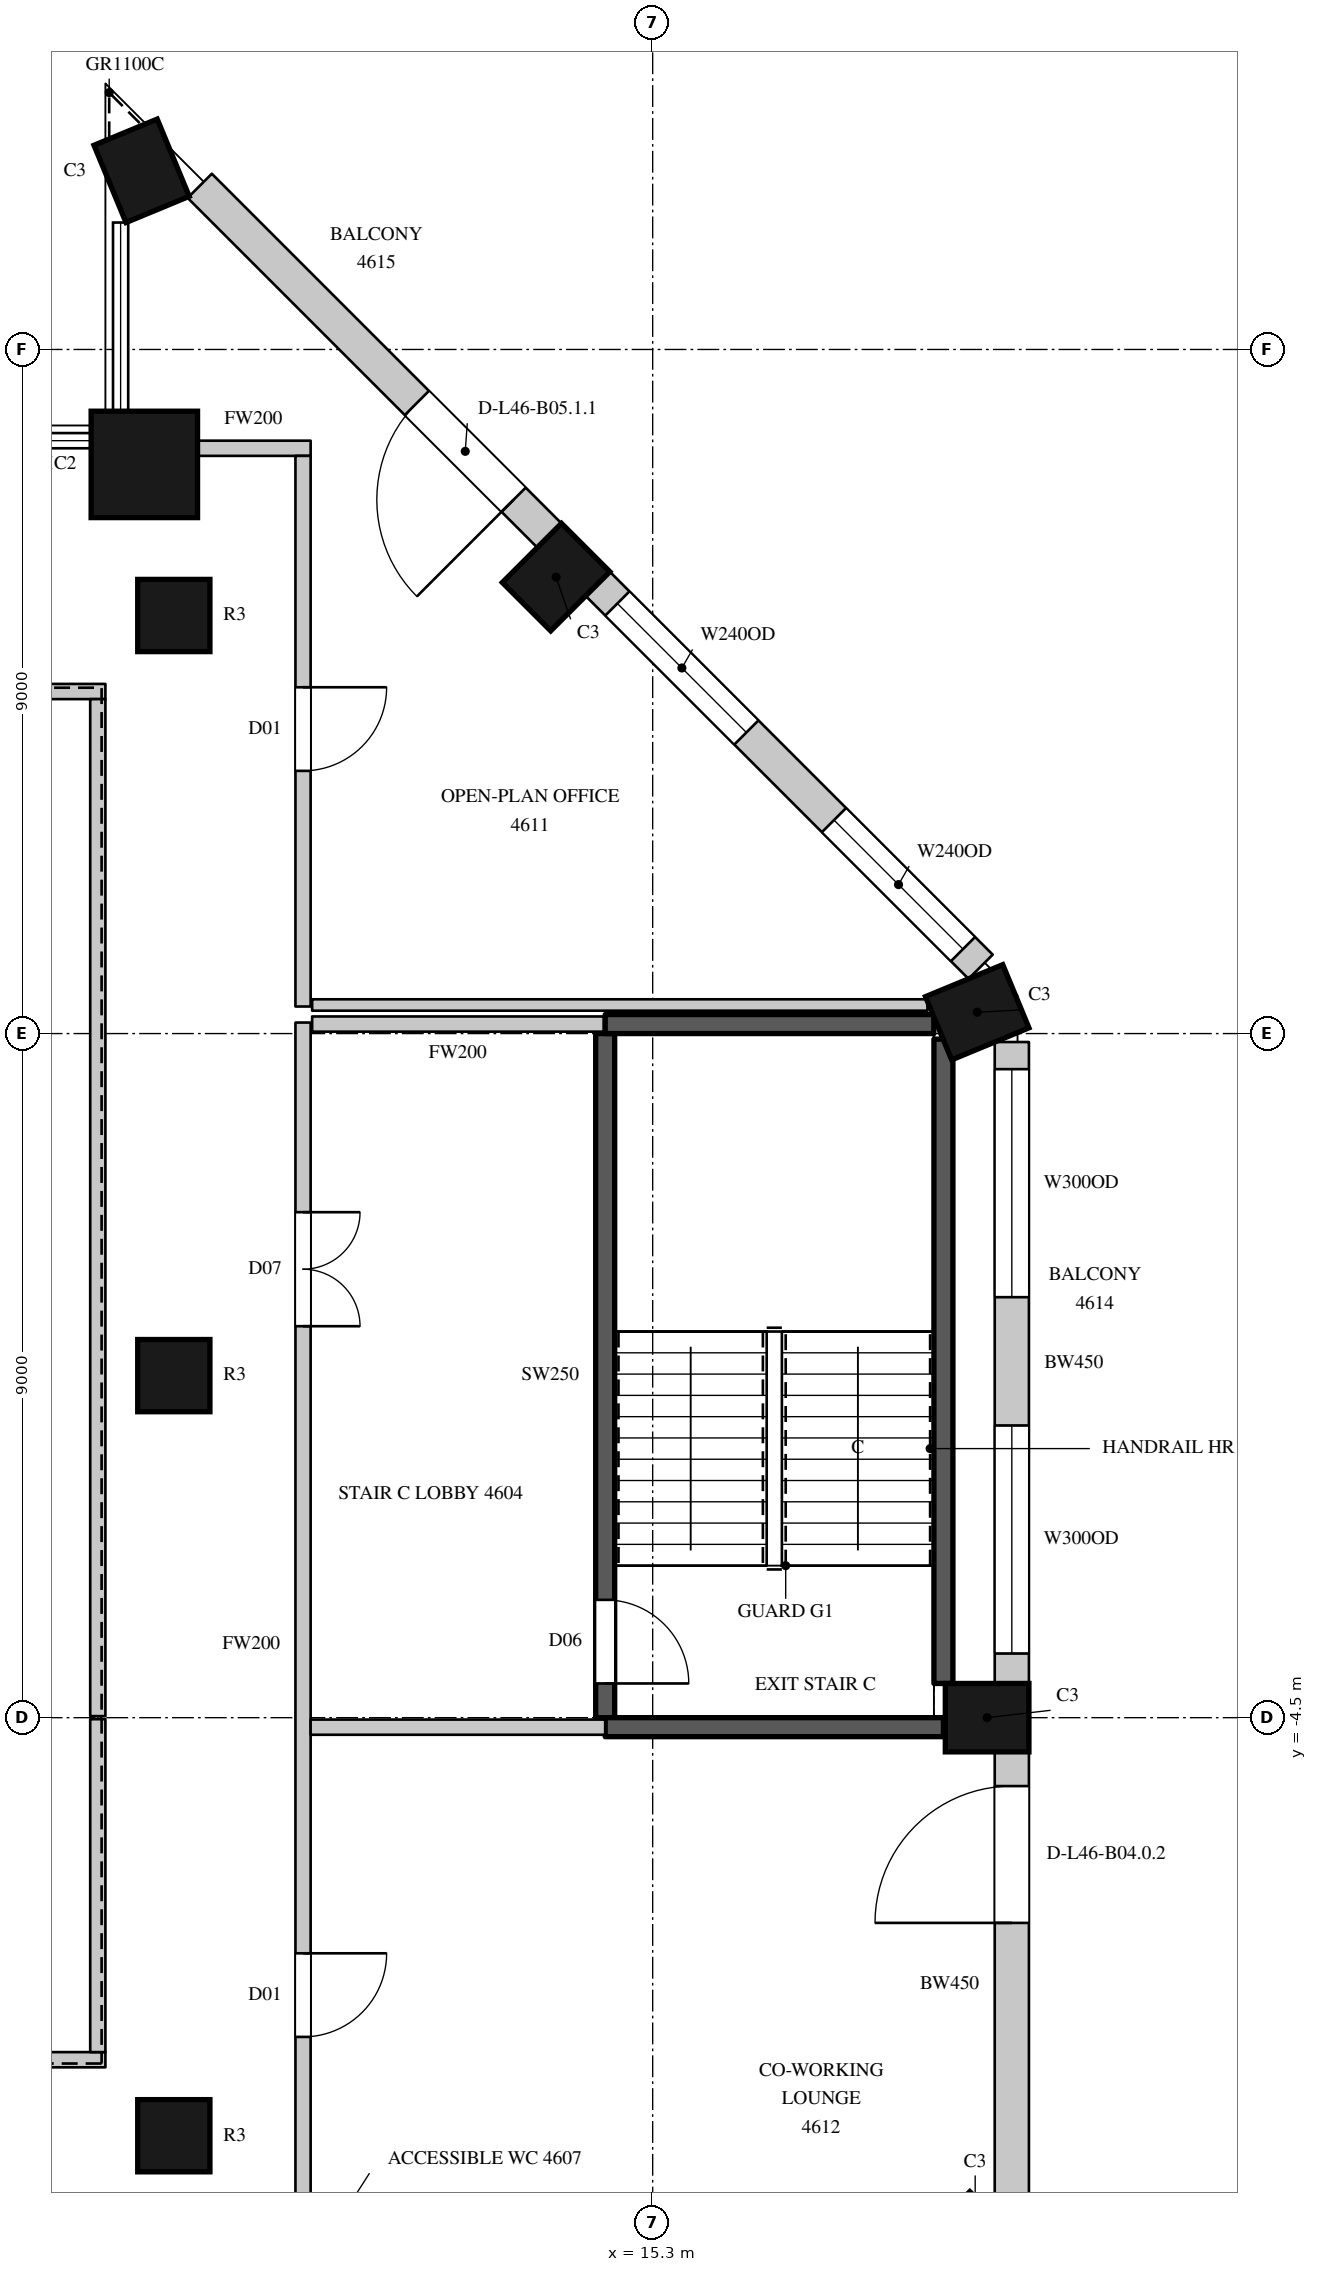
"""IFC4 building model, lengths in metres.
Left out: names, types, materials, properties, quantities, classifications, styles, units other than length and angle.
Written with IfcOpenShell. Run it as: python <this file> out.ifc"""

import sys

from ifc_helpers import new_model, si_unit, direction, frame, frame_2d, origin, origin_2d, place, context, subcontext, project, spatial, rectangle, circle, extrude, element, fill, save


model = new_model("IFC4")
c1 = context("Model", 3, precision=1e-05, world=origin(), true_north=direction((0.0, 1.0)))
c2 = subcontext(c1, "Body", "Model", "MODEL_VIEW")
j1 = project(units=[si_unit("LENGTHUNIT", "METRE"), si_unit("PLANEANGLEUNIT", "RADIAN")], contexts=[c1])
p1 = place(None, origin())
s1 = spatial("IfcSite", under=j1, at=p1, CompositionType="ELEMENT")
p2 = place(p1, origin())
s2 = spatial("IfcBuilding", under=s1, at=p2, CompositionType="ELEMENT")
p3 = place(p2, frame((0.0, 0.0, 209.7)))
s3 = spatial("IfcBuildingStorey", under=s2, at=p3, CompositionType="ELEMENT", Elevation=209.7)
for number, where, z_axis, x_axis in (
    (1, (19.543, -11.443, 0.0), (0.0, 0.0, 1.0), (0.707, 0.707, 0.0)),
    (2, (19.7, -4.5, 0.0), (0.0, 0.0, 1.0), (0.0, 1.0, 0.0)),
    (3, (19.57, 4.78, 0.0), (0.0, 0.0, 1.0), (-0.383, 0.924, 0.0)),
    (4, (14.029, 10.505, 0.0), (0.0, 0.0, 1.0), (-0.707, 0.707, 0.0)),
    (5, (8.576, 15.85, 0.0), (0.0, 0.0, 1.0), (-0.924, -0.383, 0.0)),
):
    element("IfcColumn", number, at=place(p3, frame(where, z_axis=z_axis, x_axis=x_axis)), inside=s3, PredefinedType="COLUMN", context=c2, shape_type="SweptSolid", body=[
        extrude(rectangle(XDim=0.9, YDim=1.1, at=origin_2d()), origin(), (0.0, 0.0, 1.0), 4.1),
    ])
p4 = place(p3, frame((8.612, 11.988, 0.0), z_axis=(0.0, 0.0, 1.0), x_axis=(1.0, 0.0, 0.0)))
e6 = element("IfcColumn", 6, at=p4, inside=s3, PredefinedType="COLUMN", context=c2, shape_type="SweptSolid", body=[
    extrude(circle(Radius=0.7, at=origin_2d()), origin(), (0.0, 0.0, 1.0), 4.1),
])
for number, where, z_axis, x_axis in (
    (7, (9.0, -10.0, 0.0), (0.0, 0.0, 1.0), (1.0, 0.0, 0.0)),
    (8, (9.0, 0.0, 0.0), (0.0, 0.0, 1.0), (1.0, 0.0, 0.0)),
    (9, (9.0, 10.0, 0.0), (0.0, 0.0, 1.0), (1.0, 0.0, 0.0)),
):
    element("IfcColumn", number, at=place(p3, frame(where, z_axis=z_axis, x_axis=x_axis)), inside=s3, PredefinedType="COLUMN", context=c2, shape_type="SweptSolid", body=[
        extrude(circle(Radius=0.475, at=origin_2d()), origin(), (0.0, 0.0, 1.0), 4.1),
    ])
p5 = place(p3, frame((20.025, -11.064, 0.0), z_axis=(0.0, 0.0, 1.0), x_axis=(0.0, 1.0, 0.0)))
e10 = element("IfcWall", 10, at=p5, inside=s3, PredefinedType="SOLIDWALL", context=c2, shape_type="SweptSolid", body=[
    extrude(rectangle(XDim=6.114, YDim=0.45, at=frame_2d((3.057, 0.0))), origin(), (0.0, 0.0, 1.0), 3.8),
])
p6 = place(p5, frame((3.864, 0.0, 0.0)))
e11 = element("IfcOpeningElement", 11, at=p6, cuts=e10, PredefinedType="OPENING", context=c2, shape_type="SweptSolid", body=[
    extrude(rectangle(XDim=1.8, YDim=2.4, at=frame_2d((0.9, 1.2))), frame((0.0, 0.235, 0.0), z_axis=(0.0, -1.0, 0.0), x_axis=(1.0, 0.0, 0.0)), (0.0, 0.0, 1.0), 0.47),
])
p7 = place(p3, frame((20.025, -4.05, 0.0), z_axis=(0.0, 0.0, 1.0), x_axis=(0.0, 1.0, 0.0)))
e12 = element("IfcWall", 12, at=p7, inside=s3, PredefinedType="SOLIDWALL", context=c2, shape_type="SweptSolid", body=[
    extrude(rectangle(XDim=8.439, YDim=0.45, at=frame_2d((4.219, 0.0))), origin(), (0.0, 0.0, 1.0), 3.8),
])
p8 = place(p7, frame((0.394, 0.0, 1.05)))
e13 = element("IfcOpeningElement", 13, at=p8, cuts=e12, PredefinedType="OPENING", context=c2, shape_type="SweptSolid", body=[
    extrude(rectangle(XDim=3.0, YDim=2.4, at=frame_2d((1.5, 1.2))), frame((0.0, 0.235, 0.0), z_axis=(0.0, -1.0, 0.0), x_axis=(1.0, 0.0, 0.0)), (0.0, 0.0, 1.0), 0.47),
])
p9 = place(p7, frame((5.082, 0.0, 1.05)))
e14 = element("IfcOpeningElement", 14, at=p9, cuts=e12, PredefinedType="OPENING", context=c2, shape_type="SweptSolid", body=[
    extrude(rectangle(XDim=3.0, YDim=2.4, at=frame_2d((1.5, 1.2))), frame((0.0, 0.235, 0.0), z_axis=(0.0, -1.0, 0.0), x_axis=(1.0, 0.0, 0.0)), (0.0, 0.0, 1.0), 0.47),
])
p10 = place(p3, frame((19.615, 5.379, 0.0), z_axis=(0.0, 0.0, 1.0), x_axis=(-0.707089646058, 0.7071239159, 0.0)))
e15 = element("IfcWall", 15, at=p10, inside=s3, PredefinedType="SOLIDWALL", context=c2, shape_type="SweptSolid", body=[
    extrude(rectangle(XDim=7.124, YDim=0.45, at=frame_2d((3.562, 0.0))), origin(), (0.0, 0.0, 1.0), 3.8),
])
p11 = place(p10, frame((0.328, 0.0, 1.05)))
e16 = element("IfcOpeningElement", 16, at=p11, cuts=e15, PredefinedType="OPENING", context=c2, shape_type="SweptSolid", body=[
    extrude(rectangle(XDim=2.4, YDim=2.4, at=frame_2d((1.2, 1.2))), frame((0.0, 0.235, 0.0), z_axis=(0.0, -1.0, 0.0), x_axis=(1.0, 0.0, 0.0)), (0.0, 0.0, 1.0), 0.47),
])
p12 = place(p10, frame((4.359, 0.0, 1.05)))
e17 = element("IfcOpeningElement", 17, at=p12, cuts=e15, PredefinedType="OPENING", context=c2, shape_type="SweptSolid", body=[
    extrude(rectangle(XDim=2.4, YDim=2.4, at=frame_2d((1.2, 1.2))), frame((0.0, 0.235, 0.0), z_axis=(0.0, -1.0, 0.0), x_axis=(1.0, 0.0, 0.0)), (0.0, 0.0, 1.0), 0.47),
])
p13 = place(p3, frame((13.941, 11.053, 0.0), z_axis=(0.0, 0.0, 1.0), x_axis=(-0.707106781187, 0.707106781187, 0.0)))
e18 = element("IfcWall", 18, at=p13, inside=s3, PredefinedType="SOLIDWALL", context=c2, shape_type="SweptSolid", body=[
    extrude(rectangle(XDim=6.505, YDim=0.45, at=frame_2d((3.252, 0.0))), origin(), (0.0, 0.0, 1.0), 3.8),
])
p14 = place(p13, frame((0.665, 0.0, 0.0)))
e19 = element("IfcOpeningElement", 19, at=p14, cuts=e18, PredefinedType="OPENING", context=c2, shape_type="SweptSolid", body=[
    extrude(rectangle(XDim=1.8, YDim=2.4, at=frame_2d((0.9, 1.2))), frame((0.0, 0.235, 0.0), z_axis=(0.0, -1.0, 0.0), x_axis=(1.0, 0.0, 0.0)), (0.0, 0.0, 1.0), 0.47),
])
for number, where, z_axis, x_axis in (
    (20, (-6.1, -9.0, 0.0), (0.0, 0.0, 1.0), (1.0, 0.0, 0.0)),
    (21, (-6.1, 9.0, 0.0), (0.0, 0.0, 1.0), (1.0, 0.0, 0.0)),
):
    element("IfcWall", number, at=place(p3, frame(where, z_axis=z_axis, x_axis=x_axis)), inside=s3, PredefinedType="PARTITIONING", context=c2, shape_type="SweptSolid", body=[
        extrude(rectangle(XDim=14.2, YDim=0.2, at=frame_2d((7.1, 0.0))), origin(), (0.0, 0.0, 1.0), 3.8),
    ])
p15 = place(p3, frame((8.0, -8.9, 0.0), z_axis=(0.0, 0.0, 1.0), x_axis=(0.0, 1.0, 0.0)))
e22 = element("IfcWall", 22, at=p15, inside=s3, PredefinedType="PARTITIONING", context=c2, shape_type="SweptSolid", body=[
    extrude(rectangle(XDim=4.38, YDim=0.2, at=frame_2d((2.19, 0.0))), origin(), (0.0, 0.0, 1.0), 3.8),
])
p16 = place(p3, frame((8.0, -4.48, 0.0), z_axis=(0.0, 0.0, 1.0), x_axis=(0.0, 1.0, 0.0)))
e23 = element("IfcWall", 23, at=p16, inside=s3, PredefinedType="PARTITIONING", context=c2, shape_type="SweptSolid", body=[
    extrude(rectangle(XDim=13.38, YDim=0.2, at=frame_2d((6.69, 0.0))), origin(), (0.0, 0.0, 1.0), 3.8),
])
p17 = place(p3, frame((9.296, 12.2, 0.0), z_axis=(0.0, 0.0, 1.0), x_axis=(1.0, 0.0, 0.0)))
e24 = element("IfcWall", 24, at=p17, inside=s3, PredefinedType="PARTITIONING", context=c2, shape_type="SweptSolid", body=[
    extrude(rectangle(XDim=1.504, YDim=0.2, at=frame_2d((0.752, 0.0))), origin(), (0.0, 0.0, 1.0), 3.8),
])
p18 = place(p3, frame((10.7, -11.7, 0.0), z_axis=(0.0, 0.0, 1.0), x_axis=(0.0, 1.0, 0.0)))
e25 = element("IfcWall", 25, at=p18, inside=s3, PredefinedType="PARTITIONING", context=c2, shape_type="SweptSolid", body=[
    extrude(rectangle(XDim=16.345, YDim=0.2, at=frame_2d((8.172, 0.0))), origin(), (0.0, 0.0, 1.0), 3.8),
])
p19 = place(p18, frame((12.35, 0.0, 0.0)))
e26 = element("IfcOpeningElement", 26, at=p19, cuts=e25, PredefinedType="OPENING", context=c2, shape_type="SweptSolid", body=[
    extrude(rectangle(XDim=1.5, YDim=2.4, at=frame_2d((0.75, 1.2))), frame((0.0, 0.11, 0.0), z_axis=(0.0, -1.0, 0.0), x_axis=(1.0, 0.0, 0.0)), (0.0, 0.0, 1.0), 0.22),
])
p20 = place(p18, frame((3.0, 0.0, 0.0)))
e27 = element("IfcOpeningElement", 27, at=p20, cuts=e25, PredefinedType="OPENING", context=c2, shape_type="SweptSolid", body=[
    extrude(rectangle(XDim=1.1, YDim=2.4, at=frame_2d((0.55, 1.2))), frame((0.0, 0.11, 0.0), z_axis=(0.0, -1.0, 0.0), x_axis=(1.0, 0.0, 0.0)), (0.0, 0.0, 1.0), 0.22),
])
p21 = place(p3, frame((10.8, -4.625, 0.0), z_axis=(0.0, 0.0, 1.0), x_axis=(1.0, 0.0, 0.0)))
e28 = element("IfcWall", 28, at=p21, inside=s3, PredefinedType="PARTITIONING", context=c2, shape_type="SweptSolid", body=[
    extrude(rectangle(XDim=3.875, YDim=0.2, at=frame_2d((1.938, 0.0))), origin(), (0.0, 0.0, 1.0), 3.8),
])
p22 = place(p3, frame((10.7, 4.856, 0.0), z_axis=(0.0, 0.0, 1.0), x_axis=(0.0, 1.0, 0.0)))
e29 = element("IfcWall", 29, at=p22, inside=s3, PredefinedType="PARTITIONING", context=c2, shape_type="SweptSolid", body=[
    extrude(rectangle(XDim=7.244, YDim=0.2, at=frame_2d((3.622, 0.0))), origin(), (0.0, 0.0, 1.0), 3.8),
])
p23 = place(p22, frame((3.1, 0.0, 0.0)))
e30 = element("IfcOpeningElement", 30, at=p23, cuts=e29, PredefinedType="OPENING", context=c2, shape_type="SweptSolid", body=[
    extrude(rectangle(XDim=1.1, YDim=2.4, at=frame_2d((0.55, 1.2))), frame((0.0, 0.11, 0.0), z_axis=(0.0, -1.0, 0.0), x_axis=(1.0, 0.0, 0.0)), (0.0, 0.0, 1.0), 0.22),
])
p24 = place(p3, frame((10.82, 4.625, 0.0), z_axis=(0.0, 0.0, 1.0), x_axis=(1.0, 0.0, 0.0)))
e31 = element("IfcWall", 31, at=p24, inside=s3, PredefinedType="PARTITIONING", context=c2, shape_type="SweptSolid", body=[
    extrude(rectangle(XDim=3.835, YDim=0.2, at=frame_2d((1.917, 0.0))), origin(), (0.0, 0.0, 1.0), 3.8),
])
p25 = place(p3, frame((10.82, 4.876, 0.0), z_axis=(0.0, 0.0, 1.0), x_axis=(1.0, 0.0, 0.0)))
e32 = element("IfcWall", 32, at=p25, inside=s3, PredefinedType="PARTITIONING", context=c2, shape_type="SweptSolid", body=[
    extrude(rectangle(XDim=8.095, YDim=0.15, at=frame_2d((4.047, 0.0))), origin(), (0.0, 0.0, 1.0), 3.8),
])
p26 = place(p3, frame((14.675, -4.5, 0.0), z_axis=(0.0, 0.0, 1.0), x_axis=(0.0, 1.0, 0.0)))
e33 = element("IfcWall", 33, at=p26, inside=s3, PredefinedType="SHEAR", context=c2, shape_type="SweptSolid", body=[
    extrude(rectangle(XDim=9.0, YDim=0.25, at=frame_2d((4.5, 0.0))), origin(), (0.0, 0.0, 1.0), 3.8),
])
p27 = place(p26, frame((0.45, 0.0, 0.0)))
e34 = element("IfcOpeningElement", 34, at=p27, cuts=e33, PredefinedType="OPENING", context=c2, shape_type="SweptSolid", body=[
    extrude(rectangle(XDim=1.1, YDim=2.2, at=frame_2d((0.55, 1.1))), frame((0.0, 0.135, 0.0), z_axis=(0.0, -1.0, 0.0), x_axis=(1.0, 0.0, 0.0)), (0.0, 0.0, 1.0), 0.27),
])
p28 = place(p3, frame((14.675, -4.625, 0.0), z_axis=(0.0, 0.0, 1.0), x_axis=(1.0, 0.0, 0.0)))
e35 = element("IfcWall", 35, at=p28, inside=s3, PredefinedType="SHEAR", context=c2, shape_type="SweptSolid", body=[
    extrude(rectangle(XDim=4.45, YDim=0.25, at=frame_2d((2.225, 0.0))), origin(), (0.0, 0.0, 1.0), 3.8),
])
p29 = place(p3, frame((14.675, 4.625, 0.0), z_axis=(0.0, 0.0, 1.0), x_axis=(1.0, 0.0, 0.0)))
e36 = element("IfcWall", 36, at=p29, inside=s3, PredefinedType="SHEAR", context=c2, shape_type="SweptSolid", body=[
    extrude(rectangle(XDim=4.324, YDim=0.25, at=frame_2d((2.162, 0.0))), origin(), (0.0, 0.0, 1.0), 3.8),
])
p30 = place(p3, frame((19.125, -4.05, 0.0), z_axis=(0.0, 0.0, 1.0), x_axis=(0.0, 1.0, 0.0)))
e37 = element("IfcWall", 37, at=p30, inside=s3, PredefinedType="SHEAR", context=c2, shape_type="SweptSolid", body=[
    extrude(rectangle(XDim=8.477, YDim=0.25, at=frame_2d((4.238, 0.0))), origin(), (0.0, 0.0, 1.0), 3.8),
])
p31 = place(p6, origin())
e38 = element("IfcDoor", 38, at=p31, inside=s3, OperationType="SLIDING_TO_LEFT", PredefinedType="DOOR", context=c2, shape_type="SweptSolid", body=[
    extrude(rectangle(XDim=1.8, YDim=2.4, at=frame_2d((0.9, 1.2))), frame((0.0, 0.13, 0.0), z_axis=(0.0, -1.0, 0.0), x_axis=(1.0, 0.0, 0.0)), (0.0, 0.0, 1.0), 0.05),
])
fill(e11, e38)
p32 = place(p8, origin())
e39 = element("IfcWindow", 39, at=p32, inside=s3, PartitioningType="SINGLE_PANEL", PredefinedType="WINDOW", context=c2, shape_type="SweptSolid", body=[
    extrude(rectangle(XDim=3.0, YDim=2.4, at=frame_2d((1.5, 1.2))), frame((0.0, 0.135, 0.0), z_axis=(0.0, -1.0, 0.0), x_axis=(1.0, 0.0, 0.0)), (0.0, 0.0, 1.0), 0.06),
])
fill(e13, e39)
p33 = place(p9, origin())
e40 = element("IfcWindow", 40, at=p33, inside=s3, PartitioningType="SINGLE_PANEL", PredefinedType="WINDOW", context=c2, shape_type="SweptSolid", body=[
    extrude(rectangle(XDim=3.0, YDim=2.4, at=frame_2d((1.5, 1.2))), frame((0.0, 0.135, 0.0), z_axis=(0.0, -1.0, 0.0), x_axis=(1.0, 0.0, 0.0)), (0.0, 0.0, 1.0), 0.06),
])
fill(e14, e40)
p34 = place(p11, origin())
e41 = element("IfcWindow", 41, at=p34, inside=s3, PartitioningType="SINGLE_PANEL", PredefinedType="WINDOW", context=c2, shape_type="SweptSolid", body=[
    extrude(rectangle(XDim=2.4, YDim=2.4, at=frame_2d((1.2, 1.2))), frame((0.0, 0.135, 0.0), z_axis=(0.0, -1.0, 0.0), x_axis=(1.0, 0.0, 0.0)), (0.0, 0.0, 1.0), 0.06),
])
fill(e16, e41)
p35 = place(p12, origin())
e42 = element("IfcWindow", 42, at=p35, inside=s3, PartitioningType="SINGLE_PANEL", PredefinedType="WINDOW", context=c2, shape_type="SweptSolid", body=[
    extrude(rectangle(XDim=2.4, YDim=2.4, at=frame_2d((1.2, 1.2))), frame((0.0, 0.135, 0.0), z_axis=(0.0, -1.0, 0.0), x_axis=(1.0, 0.0, 0.0)), (0.0, 0.0, 1.0), 0.06),
])
fill(e17, e42)
p36 = place(p14, origin())
e43 = element("IfcDoor", 43, at=p36, inside=s3, OperationType="SLIDING_TO_LEFT", PredefinedType="DOOR", context=c2, shape_type="SweptSolid", body=[
    extrude(rectangle(XDim=1.8, YDim=2.4, at=frame_2d((0.9, 1.2))), frame((0.0, 0.13, 0.0), z_axis=(0.0, -1.0, 0.0), x_axis=(1.0, 0.0, 0.0)), (0.0, 0.0, 1.0), 0.05),
])
fill(e19, e43)
p37 = place(p19, origin())
e44 = element("IfcDoor", 44, at=p37, inside=s3, OperationType="DOUBLE_DOOR_SINGLE_SWING", PredefinedType="DOOR", context=c2, shape_type="SweptSolid", body=[
    extrude(rectangle(XDim=1.5, YDim=2.4, at=frame_2d((0.75, 1.2))), frame((0.0, 0.025, 0.0), z_axis=(0.0, -1.0, 0.0), x_axis=(1.0, 0.0, 0.0)), (0.0, 0.0, 1.0), 0.05),
])
fill(e26, e44)
p38 = place(p23, origin())
e45 = element("IfcDoor", 45, at=p38, inside=s3, OperationType="SINGLE_SWING_LEFT", PredefinedType="DOOR", context=c2, shape_type="SweptSolid", body=[
    extrude(rectangle(XDim=1.1, YDim=2.4, at=frame_2d((0.55, 1.2))), frame((0.0, 0.025, 0.0), z_axis=(0.0, -1.0, 0.0), x_axis=(1.0, 0.0, 0.0)), (0.0, 0.0, 1.0), 0.05),
])
fill(e30, e45)
p39 = place(p20, origin())
e46 = element("IfcDoor", 46, at=p39, inside=s3, OperationType="SINGLE_SWING_LEFT", PredefinedType="DOOR", context=c2, shape_type="SweptSolid", body=[
    extrude(rectangle(XDim=1.1, YDim=2.4, at=frame_2d((0.55, 1.2))), frame((0.0, 0.025, 0.0), z_axis=(0.0, -1.0, 0.0), x_axis=(1.0, 0.0, 0.0)), (0.0, 0.0, 1.0), 0.05),
])
fill(e27, e46)
p40 = place(p27, origin())
e47 = element("IfcDoor", 47, at=p40, inside=s3, OperationType="SINGLE_SWING_RIGHT", PredefinedType="DOOR", context=c2, shape_type="SweptSolid", body=[
    extrude(rectangle(XDim=1.1, YDim=2.2, at=frame_2d((0.55, 1.1))), frame((0.0, 0.025, 0.0), z_axis=(0.0, -1.0, 0.0), x_axis=(1.0, 0.0, 0.0)), (0.0, 0.0, 1.0), 0.05),
])
fill(e34, e47)
save(model, sys.argv[1])
